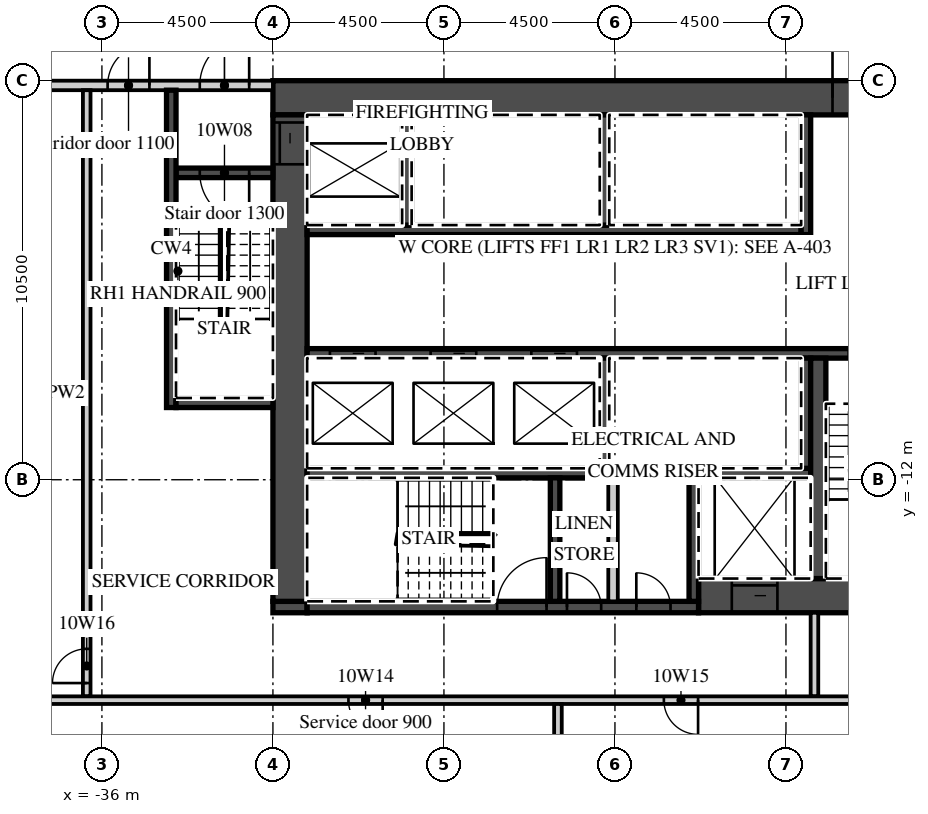
"""IFC4 building model, lengths in metres.
Left out: names, types, materials, properties, quantities, classifications, styles, units other than length and angle.
Written with IfcOpenShell. Run it as: python <this file> out.ifc"""

import sys

from ifc_helpers import new_model, si_unit, direction, frame, frame_2d, origin, place, context, subcontext, project, spatial, rectangle, extrude, element, fill, save


model = new_model("IFC4")
c1 = context("Model", 3, precision=1e-05, world=origin(), true_north=direction((0.0, 1.0)))
c2 = subcontext(c1, "Body", "Model", "MODEL_VIEW")
j1 = project(units=[si_unit("LENGTHUNIT", "METRE"), si_unit("PLANEANGLEUNIT", "RADIAN")], contexts=[c1])
p1 = place(None, origin())
s1 = spatial("IfcSite", under=j1, at=p1, CompositionType="ELEMENT")
p2 = place(p1, origin())
s2 = spatial("IfcBuilding", under=s1, at=p2, CompositionType="ELEMENT")
p3 = place(p2, frame((0.0, 0.0, 63.3)))
s3 = spatial("IfcBuildingStorey", under=s2, at=p3, CompositionType="ELEMENT", Elevation=63.3)
p4 = place(p3, frame((-31.5, -1.95, 0.0), z_axis=(0.0, 0.0, 1.0), x_axis=(1.0, 0.0, 0.0)))
e1 = element("IfcWall", 1, at=p4, inside=s3, PredefinedType="SHEAR", context=c2, shape_type="SweptSolid", body=[
    extrude(rectangle(XDim=18.0, YDim=0.9, at=frame_2d((9.0, 0.0))), origin(), (0.0, 0.0, 1.0), 3.02),
])
p5 = place(p4, frame((14.725, 0.0, 0.0)))
e2 = element("IfcOpeningElement", 2, at=p5, cuts=e1, PredefinedType="OPENING", context=c2, shape_type="SweptSolid", body=[
    extrude(rectangle(XDim=1.8, YDim=2.1, at=frame_2d((0.9, 1.05))), frame((0.0, 0.46, 0.0), z_axis=(0.0, -1.0, 0.0), x_axis=(1.0, 0.0, 0.0)), (0.0, 0.0, 1.0), 0.92),
])
p6 = place(p3, frame((-20.3, -15.05, 0.0), z_axis=(0.0, 0.0, 1.0), x_axis=(1.0, 0.0, 0.0)))
e3 = element("IfcWall", 3, at=p6, inside=s3, PredefinedType="SHEAR", context=c2, shape_type="SweptSolid", body=[
    extrude(rectangle(XDim=6.8, YDim=0.9, at=frame_2d((3.4, 0.0))), origin(), (0.0, 0.0, 1.0), 3.02),
])
p7 = place(p6, frame((0.875, 0.0, 0.0)))
e4 = element("IfcOpeningElement", 4, at=p7, cuts=e3, PredefinedType="OPENING", context=c2, shape_type="SweptSolid", body=[
    extrude(rectangle(XDim=1.2, YDim=2.1, at=frame_2d((0.6, 1.05))), frame((0.0, 0.46, 0.0), z_axis=(0.0, -1.0, 0.0), x_axis=(1.0, 0.0, 0.0)), (0.0, 0.0, 1.0), 0.92),
])
p8 = place(p3, frame((-31.5, -15.35, 0.0), z_axis=(0.0, 0.0, 1.0), x_axis=(1.0, 0.0, 0.0)))
e5 = element("IfcWall", 5, at=p8, inside=s3, PredefinedType="SHEAR", context=c2, shape_type="SweptSolid", body=[
    extrude(rectangle(XDim=0.9, YDim=0.3, at=frame_2d((0.45, 0.0))), origin(), (0.0, 0.0, 1.0), 3.02),
])
p9 = place(p3, frame((-30.6, -15.35, 0.0), z_axis=(0.0, 0.0, 1.0), x_axis=(1.0, 0.0, 0.0)))
e6 = element("IfcWall", 6, at=p9, inside=s3, PredefinedType="SHEAR", context=c2, shape_type="SweptSolid", body=[
    extrude(rectangle(XDim=10.3, YDim=0.3, at=frame_2d((5.15, 0.0))), origin(), (0.0, 0.0, 1.0), 3.02),
])
p10 = place(p9, frame((5.0, 0.0, 0.0)))
e7 = element("IfcOpeningElement", 7, at=p10, cuts=e6, PredefinedType="OPENING", context=c2, shape_type="SweptSolid", body=[
    extrude(rectangle(XDim=1.3, YDim=2.1, at=frame_2d((0.65, 1.05))), frame((0.0, 0.16, 0.0), z_axis=(0.0, -1.0, 0.0), x_axis=(1.0, 0.0, 0.0)), (0.0, 0.0, 1.0), 0.32),
])
p11 = place(p9, frame((6.837, 0.0, 0.0)))
e8 = element("IfcOpeningElement", 8, at=p11, cuts=e6, PredefinedType="OPENING", context=c2, shape_type="SweptSolid", body=[
    extrude(rectangle(XDim=0.9, YDim=2.1, at=frame_2d((0.45, 1.05))), frame((0.0, 0.16, 0.0), z_axis=(0.0, -1.0, 0.0), x_axis=(1.0, 0.0, 0.0)), (0.0, 0.0, 1.0), 0.32),
])
p12 = place(p9, frame((8.663, 0.0, 0.0)))
e9 = element("IfcOpeningElement", 9, at=p12, cuts=e6, PredefinedType="OPENING", context=c2, shape_type="SweptSolid", body=[
    extrude(rectangle(XDim=0.9, YDim=2.1, at=frame_2d((0.45, 1.05))), frame((0.0, 0.16, 0.0), z_axis=(0.0, -1.0, 0.0), x_axis=(1.0, 0.0, 0.0)), (0.0, 0.0, 1.0), 0.32),
])
p13 = place(p3, frame((-31.05, -15.2, 0.0), z_axis=(0.0, 0.0, 1.0), x_axis=(0.0, 1.0, 0.0)))
e10 = element("IfcWall", 10, at=p13, inside=s3, PredefinedType="SHEAR", context=c2, shape_type="SweptSolid", body=[
    extrude(rectangle(XDim=12.8, YDim=0.9, at=frame_2d((6.4, 0.0))), origin(), (0.0, 0.0, 1.0), 3.02),
])
p14 = place(p13, frame((11.5, 0.0, 0.0)))
e11 = element("IfcOpeningElement", 11, at=p14, cuts=e10, PredefinedType="OPENING", context=c2, shape_type="SweptSolid", body=[
    extrude(rectangle(XDim=1.1, YDim=2.1, at=frame_2d((0.55, 1.05))), frame((0.0, 0.46, 0.0), z_axis=(0.0, -1.0, 0.0), x_axis=(1.0, 0.0, 0.0)), (0.0, 0.0, 1.0), 0.92),
])
p15 = place(p3, frame((-30.6, -5.425, 0.0), z_axis=(0.0, 0.0, 1.0), x_axis=(1.0, 0.0, 0.0)))
e12 = element("IfcWall", 12, at=p15, inside=s3, PredefinedType="SHEAR", context=c2, shape_type="SweptSolid", body=[
    extrude(rectangle(XDim=13.0, YDim=0.25, at=frame_2d((6.5, 0.0))), origin(), (0.0, 0.0, 1.0), 3.02),
])
p16 = place(p3, frame((-17.475, -5.55, 0.0), z_axis=(0.0, 0.0, 1.0), x_axis=(0.0, 1.0, 0.0)))
e13 = element("IfcWall", 13, at=p16, inside=s3, PredefinedType="SHEAR", context=c2, shape_type="SweptSolid", body=[
    extrude(rectangle(XDim=3.15, YDim=0.25, at=frame_2d((1.575, 0.0))), origin(), (0.0, 0.0, 1.0), 3.02),
])
for number, where, z_axis, x_axis in (
    (14, (-27.975, -5.3, 0.0), (0.0, 0.0, 1.0), (0.0, 1.0, 0.0)),
    (15, (-22.775, -5.3, 0.0), (0.0, 0.0, 1.0), (0.0, 1.0, 0.0)),
):
    element("IfcWall", number, at=place(p3, frame(where, z_axis=z_axis, x_axis=x_axis)), inside=s3, PredefinedType="SHEAR", context=c2, shape_type="SweptSolid", body=[
        extrude(rectangle(XDim=2.9, YDim=0.25, at=frame_2d((1.45, 0.0))), origin(), (0.0, 0.0, 1.0), 3.02),
    ])
p17 = place(p3, frame((-30.6, -8.675, 0.0), z_axis=(0.0, 0.0, 1.0), x_axis=(1.0, 0.0, 0.0)))
e16 = element("IfcWall", 16, at=p17, inside=s3, PredefinedType="SHEAR", context=c2, shape_type="SweptSolid", body=[
    extrude(rectangle(XDim=16.2, YDim=0.25, at=frame_2d((8.1, 0.0))), origin(), (0.0, 0.0, 1.0), 3.02),
])
p18 = place(p17, frame((0.6, 0.0, 0.0)))
e17 = element("IfcOpeningElement", 17, at=p18, cuts=e16, PredefinedType="OPENING", context=c2, shape_type="SweptSolid", body=[
    extrude(rectangle(XDim=1.2, YDim=2.1, at=frame_2d((0.6, 1.05))), frame((0.0, 0.135, 0.0), z_axis=(0.0, -1.0, 0.0), x_axis=(1.0, 0.0, 0.0)), (0.0, 0.0, 1.0), 0.27),
])
p19 = place(p17, frame((3.25, 0.0, 0.0)))
e18 = element("IfcOpeningElement", 18, at=p19, cuts=e16, PredefinedType="OPENING", context=c2, shape_type="SweptSolid", body=[
    extrude(rectangle(XDim=1.2, YDim=2.1, at=frame_2d((0.6, 1.05))), frame((0.0, 0.135, 0.0), z_axis=(0.0, -1.0, 0.0), x_axis=(1.0, 0.0, 0.0)), (0.0, 0.0, 1.0), 0.27),
])
p20 = place(p17, frame((5.9, 0.0, 0.0)))
e19 = element("IfcOpeningElement", 19, at=p20, cuts=e16, PredefinedType="OPENING", context=c2, shape_type="SweptSolid", body=[
    extrude(rectangle(XDim=1.2, YDim=2.1, at=frame_2d((0.6, 1.05))), frame((0.0, 0.135, 0.0), z_axis=(0.0, -1.0, 0.0), x_axis=(1.0, 0.0, 0.0)), (0.0, 0.0, 1.0), 0.27),
])
p21 = place(p17, frame((14.25, 0.0, 0.0)))
e20 = element("IfcOpeningElement", 20, at=p21, cuts=e16, PredefinedType="OPENING", context=c2, shape_type="SweptSolid", body=[
    extrude(rectangle(XDim=1.3, YDim=2.1, at=frame_2d((0.65, 1.05))), frame((0.0, 0.135, 0.0), z_axis=(0.0, -1.0, 0.0), x_axis=(1.0, 0.0, 0.0)), (0.0, 0.0, 1.0), 0.27),
])
p22 = place(p3, frame((-30.6, -11.825, 0.0), z_axis=(0.0, 0.0, 1.0), x_axis=(1.0, 0.0, 0.0)))
e21 = element("IfcWall", 21, at=p22, inside=s3, PredefinedType="SHEAR", context=c2, shape_type="SweptSolid", body=[
    extrude(rectangle(XDim=13.25, YDim=0.25, at=frame_2d((6.625, 0.0))), origin(), (0.0, 0.0, 1.0), 3.02),
])
for number, where, z_axis, x_axis in (
    (22, (-17.475, -11.7, 0.0), (0.0, 0.0, 1.0), (0.0, 1.0, 0.0)),
    (23, (-22.775, -11.7, 0.0), (0.0, 0.0, 1.0), (0.0, 1.0, 0.0)),
):
    element("IfcWall", number, at=place(p3, frame(where, z_axis=z_axis, x_axis=x_axis)), inside=s3, PredefinedType="SHEAR", context=c2, shape_type="SweptSolid", body=[
        extrude(rectangle(XDim=2.9, YDim=0.25, at=frame_2d((1.45, 0.0))), origin(), (0.0, 0.0, 1.0), 3.02),
    ])
p23 = place(p3, frame((-17.15, -14.6, 0.0), z_axis=(0.0, 0.0, 1.0), x_axis=(0.0, 1.0, 0.0)))
e24 = element("IfcWall", 24, at=p23, inside=s3, PredefinedType="SHEAR", context=c2, shape_type="SweptSolid", body=[
    extrude(rectangle(XDim=5.8, YDim=0.4, at=frame_2d((2.9, 0.0))), origin(), (0.0, 0.0, 1.0), 3.02),
])
for number, where, z_axis, x_axis in (
    (25, (-20.425, -15.2, 0.0), (0.0, 0.0, 1.0), (0.0, 1.0, 0.0)),
    (26, (-24.075, -15.2, 0.0), (0.0, 0.0, 1.0), (0.0, 1.0, 0.0)),
):
    element("IfcWall", number, at=place(p3, frame(where, z_axis=z_axis, x_axis=x_axis)), inside=s3, PredefinedType="SHEAR", context=c2, shape_type="SweptSolid", body=[
        extrude(rectangle(XDim=3.25, YDim=0.25, at=frame_2d((1.625, 0.0))), origin(), (0.0, 0.0, 1.0), 3.02),
    ])
p24 = place(p3, frame((-22.55, -15.2, 0.0), z_axis=(0.0, 0.0, 1.0), x_axis=(0.0, 1.0, 0.0)))
e27 = element("IfcWall", 27, at=p24, inside=s3, PredefinedType="PARTITIONING", context=c2, shape_type="SweptSolid", body=[
    extrude(rectangle(XDim=3.25, YDim=0.25, at=frame_2d((1.625, 0.0))), origin(), (0.0, 0.0, 1.0), 3.02),
])
p25 = place(p3, frame((-44.55, -1.625, 0.0), z_axis=(0.0, 0.0, 1.0), x_axis=(1.0, 0.0, 0.0)))
e28 = element("IfcWall", 28, at=p25, inside=s3, PredefinedType="PARTITIONING", context=c2, shape_type="SweptSolid", body=[
    extrude(rectangle(XDim=13.05, YDim=0.25, at=frame_2d((6.525, 0.0))), origin(), (0.0, 0.0, 1.0), 3.02),
])
p26 = place(p25, frame((11.125, 0.0, 0.0)))
e29 = element("IfcOpeningElement", 29, at=p26, cuts=e28, PredefinedType="OPENING", context=c2, shape_type="SweptSolid", body=[
    extrude(rectangle(XDim=1.3, YDim=2.1, at=frame_2d((0.65, 1.05))), frame((0.0, 0.135, 0.0), z_axis=(0.0, -1.0, 0.0), x_axis=(1.0, 0.0, 0.0)), (0.0, 0.0, 1.0), 0.27),
])
p27 = place(p25, frame((8.7, 0.0, 0.0)))
e30 = element("IfcOpeningElement", 30, at=p27, cuts=e28, PredefinedType="OPENING", context=c2, shape_type="SweptSolid", body=[
    extrude(rectangle(XDim=1.1, YDim=2.1, at=frame_2d((0.55, 1.05))), frame((0.0, 0.135, 0.0), z_axis=(0.0, -1.0, 0.0), x_axis=(1.0, 0.0, 0.0)), (0.0, 0.0, 1.0), 0.27),
])
p28 = place(p3, frame((-34.05, -3.925, 0.0), z_axis=(0.0, 0.0, 1.0), x_axis=(1.0, 0.0, 0.0)))
e31 = element("IfcWall", 31, at=p28, inside=s3, PredefinedType="SHEAR", context=c2, shape_type="SweptSolid", body=[
    extrude(rectangle(XDim=2.55, YDim=0.25, at=frame_2d((1.275, 0.0))), origin(), (0.0, 0.0, 1.0), 3.02),
])
p29 = place(p28, frame((0.625, 0.0, 0.0)))
e32 = element("IfcOpeningElement", 32, at=p29, cuts=e31, PredefinedType="OPENING", context=c2, shape_type="SweptSolid", body=[
    extrude(rectangle(XDim=1.3, YDim=2.1, at=frame_2d((0.65, 1.05))), frame((0.0, 0.135, 0.0), z_axis=(0.0, -1.0, 0.0), x_axis=(1.0, 0.0, 0.0)), (0.0, 0.0, 1.0), 0.27),
])
p30 = place(p3, frame((-34.175, -10.1, 0.0), z_axis=(0.0, 0.0, 1.0), x_axis=(0.0, 1.0, 0.0)))
e33 = element("IfcWall", 33, at=p30, inside=s3, PredefinedType="SHEAR", context=c2, shape_type="SweptSolid", body=[
    extrude(rectangle(XDim=8.35, YDim=0.25, at=frame_2d((4.175, 0.0))), origin(), (0.0, 0.0, 1.0), 3.02),
])
p31 = place(p3, frame((-34.05, -9.975, 0.0), z_axis=(0.0, 0.0, 1.0), x_axis=(1.0, 0.0, 0.0)))
e34 = element("IfcWall", 34, at=p31, inside=s3, PredefinedType="SHEAR", context=c2, shape_type="SweptSolid", body=[
    extrude(rectangle(XDim=2.55, YDim=0.25, at=frame_2d((1.275, 0.0))), origin(), (0.0, 0.0, 1.0), 3.02),
])
p32 = place(p3, frame((-17.25, -17.7, 0.0), z_axis=(0.0, 0.0, 1.0), x_axis=(0.0, 1.0, 0.0)))
e35 = element("IfcWall", 35, at=p32, inside=s3, PredefinedType="PARTITIONING", context=c2, shape_type="SweptSolid", body=[
    extrude(rectangle(XDim=2.2, YDim=0.2, at=frame_2d((1.1, 0.0))), origin(), (0.0, 0.0, 1.0), 3.02),
])
p33 = place(p3, frame((-36.4, -17.7, 0.0), z_axis=(0.0, 0.0, 1.0), x_axis=(0.0, 1.0, 0.0)))
e36 = element("IfcWall", 36, at=p33, inside=s3, PredefinedType="PARTITIONING", context=c2, shape_type="SweptSolid", body=[
    extrude(rectangle(XDim=15.95, YDim=0.2, at=frame_2d((7.975, 0.0))), origin(), (0.0, 0.0, 1.0), 3.02),
])
p34 = place(p33, frame((0.35, 0.0, 0.0)))
e37 = element("IfcOpeningElement", 37, at=p34, cuts=e36, PredefinedType="OPENING", context=c2, shape_type="SweptSolid", body=[
    extrude(rectangle(XDim=0.9, YDim=2.1, at=frame_2d((0.45, 1.05))), frame((0.0, 0.11, 0.0), z_axis=(0.0, -1.0, 0.0), x_axis=(1.0, 0.0, 0.0)), (0.0, 0.0, 1.0), 0.22),
])
p35 = place(p3, frame((-44.55, -17.8, 0.0), z_axis=(0.0, 0.0, 1.0), x_axis=(1.0, 0.0, 0.0)))
e38 = element("IfcWall", 38, at=p35, inside=s3, PredefinedType="PARTITIONING", context=c2, shape_type="SweptSolid", body=[
    extrude(rectangle(XDim=30.95, YDim=0.2, at=frame_2d((15.475, 0.0))), origin(), (0.0, 0.0, 1.0), 3.02),
])
p36 = place(p35, frame((15.038, 0.0, 0.0)))
e39 = element("IfcOpeningElement", 39, at=p36, cuts=e38, PredefinedType="OPENING", context=c2, shape_type="SweptSolid", body=[
    extrude(rectangle(XDim=0.9, YDim=2.1, at=frame_2d((0.45, 1.05))), frame((0.0, 0.11, 0.0), z_axis=(0.0, -1.0, 0.0), x_axis=(1.0, 0.0, 0.0)), (0.0, 0.0, 1.0), 0.22),
])
p37 = place(p35, frame((23.337, 0.0, 0.0)))
e40 = element("IfcOpeningElement", 40, at=p37, cuts=e38, PredefinedType="OPENING", context=c2, shape_type="SweptSolid", body=[
    extrude(rectangle(XDim=0.9, YDim=2.1, at=frame_2d((0.45, 1.05))), frame((0.0, 0.11, 0.0), z_axis=(0.0, -1.0, 0.0), x_axis=(1.0, 0.0, 0.0)), (0.0, 0.0, 1.0), 0.22),
])
p38 = place(p3, frame((-24.0, -21.55, 0.0), z_axis=(0.0, 0.0, 1.0), x_axis=(0.0, 1.0, 0.0)))
e41 = element("IfcWall", 41, at=p38, inside=s3, PredefinedType="PARTITIONING", context=c2, shape_type="SweptSolid", body=[
    extrude(rectangle(XDim=3.65, YDim=0.2, at=frame_2d((1.825, 0.0))), origin(), (0.0, 0.0, 1.0), 3.02),
])
p39 = place(p18, origin())
e42 = element("IfcDoor", 42, at=p39, inside=s3, OperationType="SLIDING_TO_LEFT", PredefinedType="DOOR", context=c2, shape_type="SweptSolid", body=[
    extrude(rectangle(XDim=1.2, YDim=2.1, at=frame_2d((0.6, 1.05))), frame((0.0, 0.025, 0.0), z_axis=(0.0, -1.0, 0.0), x_axis=(1.0, 0.0, 0.0)), (0.0, 0.0, 1.0), 0.05),
])
fill(e17, e42)
p40 = place(p19, origin())
e43 = element("IfcDoor", 43, at=p40, inside=s3, OperationType="SLIDING_TO_RIGHT", PredefinedType="DOOR", context=c2, shape_type="SweptSolid", body=[
    extrude(rectangle(XDim=1.2, YDim=2.1, at=frame_2d((0.6, 1.05))), frame((0.0, 0.025, 0.0), z_axis=(0.0, -1.0, 0.0), x_axis=(1.0, 0.0, 0.0)), (0.0, 0.0, 1.0), 0.05),
])
fill(e18, e43)
p41 = place(p20, origin())
e44 = element("IfcDoor", 44, at=p41, inside=s3, OperationType="SLIDING_TO_RIGHT", PredefinedType="DOOR", context=c2, shape_type="SweptSolid", body=[
    extrude(rectangle(XDim=1.2, YDim=2.1, at=frame_2d((0.6, 1.05))), frame((0.0, 0.025, 0.0), z_axis=(0.0, -1.0, 0.0), x_axis=(1.0, 0.0, 0.0)), (0.0, 0.0, 1.0), 0.05),
])
fill(e19, e44)
p42 = place(p7, origin())
e45 = element("IfcDoor", 45, at=p42, inside=s3, OperationType="SLIDING_TO_LEFT", PredefinedType="DOOR", context=c2, shape_type="SweptSolid", body=[
    extrude(rectangle(XDim=1.2, YDim=2.1, at=frame_2d((0.6, 1.05))), frame((0.0, 0.025, 0.0), z_axis=(0.0, -1.0, 0.0), x_axis=(1.0, 0.0, 0.0)), (0.0, 0.0, 1.0), 0.05),
])
fill(e4, e45)
p43 = place(p14, origin())
e46 = element("IfcDoor", 46, at=p43, inside=s3, OperationType="SLIDING_TO_RIGHT", PredefinedType="DOOR", context=c2, shape_type="SweptSolid", body=[
    extrude(rectangle(XDim=1.1, YDim=2.1, at=frame_2d((0.55, 1.05))), frame((0.0, 0.025, 0.0), z_axis=(0.0, -1.0, 0.0), x_axis=(1.0, 0.0, 0.0)), (0.0, 0.0, 1.0), 0.05),
])
fill(e11, e46)
p44 = place(p5, origin())
e47 = element("IfcDoor", 47, at=p44, inside=s3, OperationType="DOUBLE_DOOR_DOUBLE_SWING", PredefinedType="DOOR", context=c2, shape_type="SweptSolid", body=[
    extrude(rectangle(XDim=1.8, YDim=2.1, at=frame_2d((0.9, 1.05))), frame((0.0, 0.025, 0.0), z_axis=(0.0, -1.0, 0.0), x_axis=(1.0, 0.0, 0.0)), (0.0, 0.0, 1.0), 0.05),
])
fill(e2, e47)
p45 = place(p26, origin())
e48 = element("IfcDoor", 48, at=p45, inside=s3, OperationType="SINGLE_SWING_RIGHT", PredefinedType="DOOR", context=c2, shape_type="SweptSolid", body=[
    extrude(rectangle(XDim=1.3, YDim=2.1, at=frame_2d((0.65, 1.05))), frame((0.0, 0.025, 0.0), z_axis=(0.0, -1.0, 0.0), x_axis=(1.0, 0.0, 0.0)), (0.0, 0.0, 1.0), 0.05),
])
fill(e29, e48)
p46 = place(p29, origin())
e49 = element("IfcDoor", 49, at=p46, inside=s3, OperationType="SINGLE_SWING_RIGHT", PredefinedType="DOOR", context=c2, shape_type="SweptSolid", body=[
    extrude(rectangle(XDim=1.3, YDim=2.1, at=frame_2d((0.65, 1.05))), frame((0.0, 0.025, 0.0), z_axis=(0.0, -1.0, 0.0), x_axis=(1.0, 0.0, 0.0)), (0.0, 0.0, 1.0), 0.05),
])
fill(e32, e49)
p47 = place(p27, origin())
e50 = element("IfcDoor", 50, at=p47, inside=s3, OperationType="SINGLE_SWING_RIGHT", PredefinedType="DOOR", context=c2, shape_type="SweptSolid", body=[
    extrude(rectangle(XDim=1.1, YDim=2.1, at=frame_2d((0.55, 1.05))), frame((0.0, 0.025, 0.0), z_axis=(0.0, -1.0, 0.0), x_axis=(1.0, 0.0, 0.0)), (0.0, 0.0, 1.0), 0.05),
])
fill(e30, e50)
p48 = place(p21, origin())
e51 = element("IfcDoor", 51, at=p48, inside=s3, OperationType="SINGLE_SWING_RIGHT", PredefinedType="DOOR", context=c2, shape_type="SweptSolid", body=[
    extrude(rectangle(XDim=1.3, YDim=2.1, at=frame_2d((0.65, 1.05))), frame((0.0, 0.025, 0.0), z_axis=(0.0, -1.0, 0.0), x_axis=(1.0, 0.0, 0.0)), (0.0, 0.0, 1.0), 0.05),
])
fill(e20, e51)
p49 = place(p10, origin())
e52 = element("IfcDoor", 52, at=p49, inside=s3, OperationType="SINGLE_SWING_RIGHT", PredefinedType="DOOR", context=c2, shape_type="SweptSolid", body=[
    extrude(rectangle(XDim=1.3, YDim=2.1, at=frame_2d((0.65, 1.05))), frame((0.0, 0.025, 0.0), z_axis=(0.0, -1.0, 0.0), x_axis=(1.0, 0.0, 0.0)), (0.0, 0.0, 1.0), 0.05),
])
fill(e7, e52)
p50 = place(p11, origin())
e53 = element("IfcDoor", 53, at=p50, inside=s3, OperationType="SINGLE_SWING_LEFT", PredefinedType="DOOR", context=c2, shape_type="SweptSolid", body=[
    extrude(rectangle(XDim=0.9, YDim=2.1, at=frame_2d((0.45, 1.05))), frame((0.0, 0.025, 0.0), z_axis=(0.0, -1.0, 0.0), x_axis=(1.0, 0.0, 0.0)), (0.0, 0.0, 1.0), 0.05),
])
fill(e8, e53)
p51 = place(p12, origin())
e54 = element("IfcDoor", 54, at=p51, inside=s3, OperationType="SINGLE_SWING_LEFT", PredefinedType="DOOR", context=c2, shape_type="SweptSolid", body=[
    extrude(rectangle(XDim=0.9, YDim=2.1, at=frame_2d((0.45, 1.05))), frame((0.0, 0.025, 0.0), z_axis=(0.0, -1.0, 0.0), x_axis=(1.0, 0.0, 0.0)), (0.0, 0.0, 1.0), 0.05),
])
fill(e9, e54)
p52 = place(p36, origin())
e55 = element("IfcDoor", 55, at=p52, inside=s3, OperationType="SINGLE_SWING_RIGHT", PredefinedType="DOOR", context=c2, shape_type="SweptSolid", body=[
    extrude(rectangle(XDim=0.9, YDim=2.1, at=frame_2d((0.45, 1.05))), frame((0.0, 0.025, 0.0), z_axis=(0.0, -1.0, 0.0), x_axis=(1.0, 0.0, 0.0)), (0.0, 0.0, 1.0), 0.05),
])
fill(e39, e55)
p53 = place(p37, origin())
e56 = element("IfcDoor", 56, at=p53, inside=s3, OperationType="SINGLE_SWING_RIGHT", PredefinedType="DOOR", context=c2, shape_type="SweptSolid", body=[
    extrude(rectangle(XDim=0.9, YDim=2.1, at=frame_2d((0.45, 1.05))), frame((0.0, 0.025, 0.0), z_axis=(0.0, -1.0, 0.0), x_axis=(1.0, 0.0, 0.0)), (0.0, 0.0, 1.0), 0.05),
])
fill(e40, e56)
p54 = place(p34, origin())
e57 = element("IfcDoor", 57, at=p54, inside=s3, OperationType="SINGLE_SWING_LEFT", PredefinedType="DOOR", context=c2, shape_type="SweptSolid", body=[
    extrude(rectangle(XDim=0.9, YDim=2.1, at=frame_2d((0.45, 1.05))), frame((0.0, 0.025, 0.0), z_axis=(0.0, -1.0, 0.0), x_axis=(1.0, 0.0, 0.0)), (0.0, 0.0, 1.0), 0.05),
])
fill(e37, e57)
save(model, sys.argv[1])
